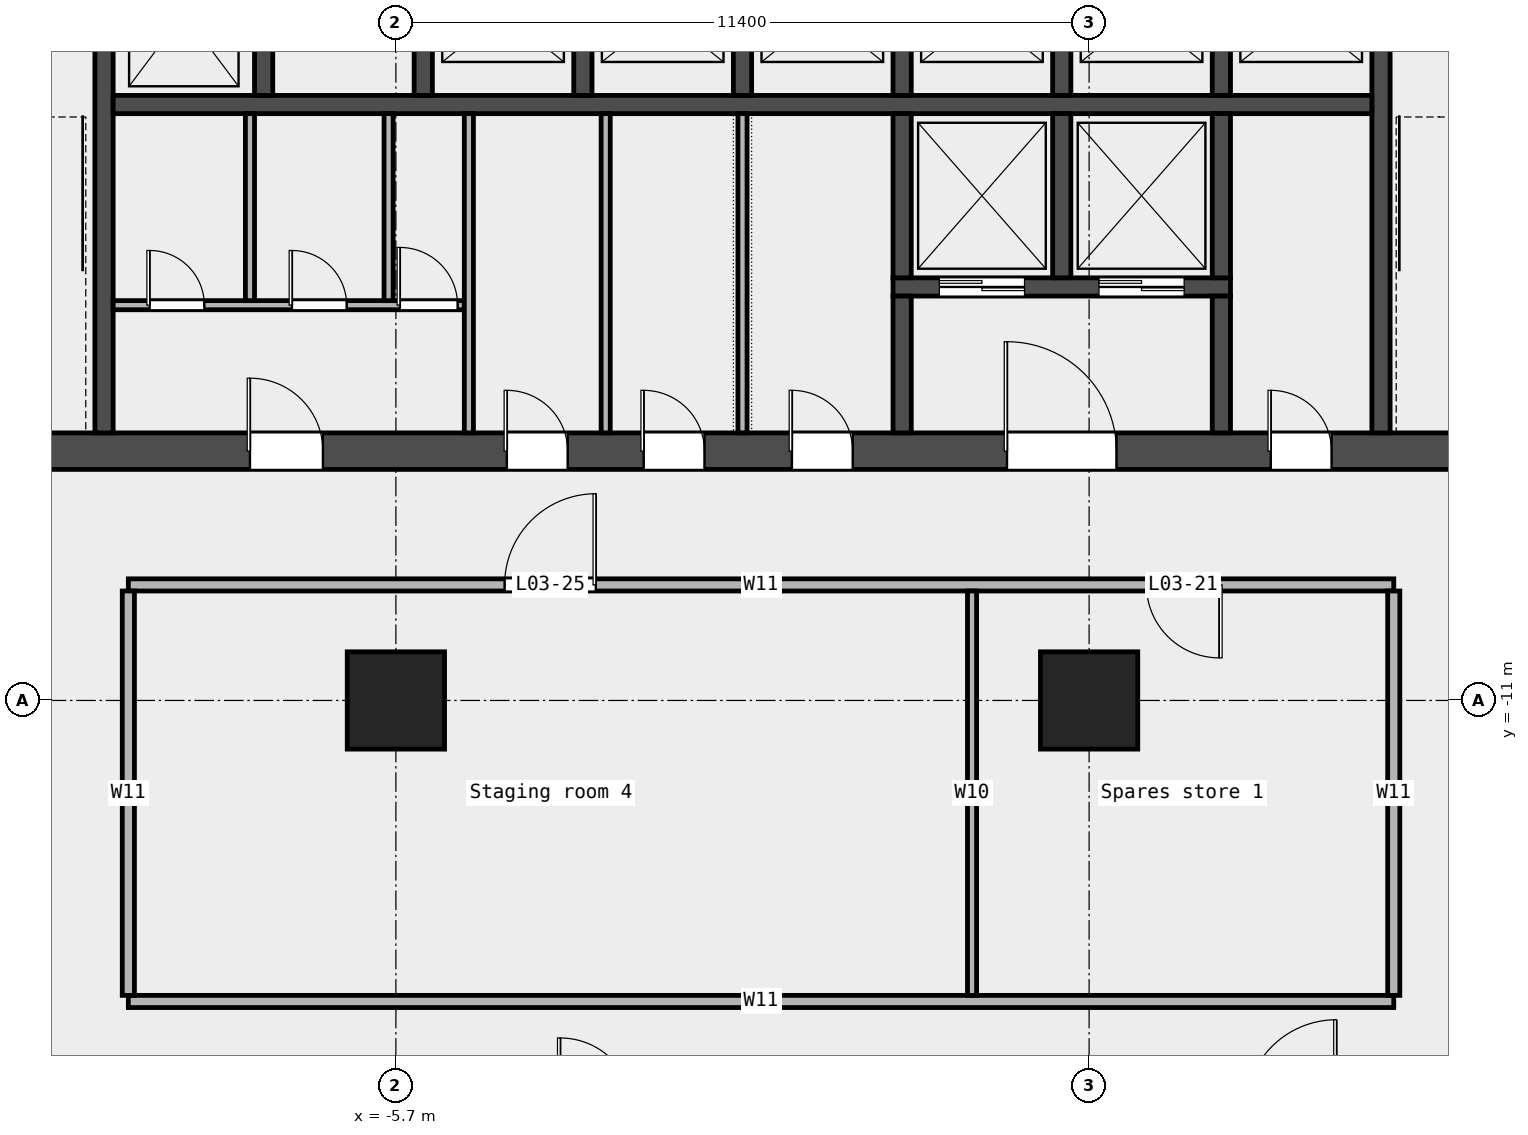
"""IFC4 building model, lengths in metres.
Left out: names, types, materials, properties, quantities, classifications, styles, units other than length and angle.
Written with IfcOpenShell. Run it as: python <this file> out.ifc"""

import sys

from ifc_helpers import new_model, si_unit, direction, frame, frame_2d, origin, origin_2d, place, context, subcontext, project, spatial, rectangle, extrude, element, fill, save


model = new_model("IFC4")
c1 = context("Model", 3, precision=1e-05, world=origin(), true_north=direction((0.0, 1.0)))
c2 = subcontext(c1, "Body", "Model", "MODEL_VIEW")
j1 = project(units=[si_unit("LENGTHUNIT", "METRE"), si_unit("PLANEANGLEUNIT", "RADIAN")], contexts=[c1])
p1 = place(None, origin())
s1 = spatial("IfcSite", under=j1, at=p1, CompositionType="ELEMENT")
p2 = place(p1, origin())
s2 = spatial("IfcBuilding", under=s1, at=p2, CompositionType="ELEMENT")
p3 = place(p2, frame((0.0, 0.0, 20.0)))
s3 = spatial("IfcBuildingStorey", under=s2, at=p3, CompositionType="ELEMENT", Elevation=20.0)
for number, where, z_axis, x_axis in (
    (1, (-5.7, -11.0, 0.0), (0.0, 0.0, 1.0), (1.0, 0.0, 0.0)),
    (2, (5.7, -11.0, 0.0), (0.0, 0.0, 1.0), (1.0, 0.0, 0.0)),
):
    element("IfcColumn", number, at=place(p3, frame(where, z_axis=z_axis, x_axis=x_axis)), inside=s3, PredefinedType="COLUMN", context=c2, shape_type="SweptSolid", body=[
        extrude(rectangle(XDim=1.6, YDim=1.6, at=origin_2d()), origin(), (0.0, 0.0, 1.0), 5.0),
    ])
p4 = place(p3, frame((-10.1, -15.95, 0.0), z_axis=(0.0, 0.0, 1.0), x_axis=(1.0, 0.0, 0.0)))
e3 = element("IfcWall", 3, at=p4, inside=s3, PredefinedType="PARTITIONING", context=c2, shape_type="SweptSolid", body=[
    extrude(rectangle(XDim=20.81, YDim=0.2, at=frame_2d((10.405, 0.0))), origin(), (0.0, 0.0, 1.0), 5.0),
])
p5 = place(p3, frame((-10.1, -9.1, 0.0), z_axis=(0.0, 0.0, 1.0), x_axis=(1.0, 0.0, 0.0)))
e4 = element("IfcWall", 4, at=p5, inside=s3, PredefinedType="PARTITIONING", context=c2, shape_type="SweptSolid", body=[
    extrude(rectangle(XDim=20.81, YDim=0.2, at=frame_2d((10.405, 0.0))), origin(), (0.0, 0.0, 1.0), 5.0),
])
p6 = place(p5, frame((16.742, 0.0, 0.0)))
e5 = element("IfcOpeningElement", 5, at=p6, cuts=e4, PredefinedType="OPENING", context=c2, shape_type="SweptSolid", body=[
    extrude(rectangle(XDim=1.2, YDim=2.1, at=frame_2d((0.6, 1.05))), frame((0.0, 0.112, 0.0), z_axis=(0.0, -1.0, 0.0), x_axis=(1.0, 0.0, 0.0)), (0.0, 0.0, 1.0), 0.224),
])
p7 = place(p5, frame((6.188, 0.0, 0.0)))
e6 = element("IfcOpeningElement", 6, at=p7, cuts=e4, PredefinedType="OPENING", context=c2, shape_type="SweptSolid", body=[
    extrude(rectangle(XDim=1.5, YDim=2.1, at=frame_2d((0.75, 1.05))), frame((0.0, 0.112, 0.0), z_axis=(0.0, -1.0, 0.0), x_axis=(1.0, 0.0, 0.0)), (0.0, 0.0, 1.0), 0.224),
])
p8 = place(p3, frame((-10.1, -15.85, 0.0), z_axis=(0.0, 0.0, 1.0), x_axis=(0.0, 1.0, 0.0)))
e7 = element("IfcWall", 7, at=p8, inside=s3, PredefinedType="PARTITIONING", context=c2, shape_type="SweptSolid", body=[
    extrude(rectangle(XDim=6.65, YDim=0.2, at=frame_2d((3.325, 0.0))), origin(), (0.0, 0.0, 1.0), 5.0),
])
p9 = place(p3, frame((3.775, -15.85, 0.0), z_axis=(0.0, 0.0, 1.0), x_axis=(0.0, 1.0, 0.0)))
e8 = element("IfcWall", 8, at=p9, inside=s3, PredefinedType="PARTITIONING", context=c2, shape_type="SweptSolid", body=[
    extrude(rectangle(XDim=6.65, YDim=0.15, at=frame_2d((3.325, 0.0))), origin(), (0.0, 0.0, 1.0), 5.0),
])
p10 = place(p3, frame((10.71, -15.85, 0.0), z_axis=(0.0, 0.0, 1.0), x_axis=(0.0, 1.0, 0.0)))
e9 = element("IfcWall", 9, at=p10, inside=s3, PredefinedType="PARTITIONING", context=c2, shape_type="SweptSolid", body=[
    extrude(rectangle(XDim=6.65, YDim=0.2, at=frame_2d((3.325, 0.0))), origin(), (0.0, 0.0, 1.0), 5.0),
])
p11 = place(p3, frame((-14.4, -6.9, 0.0), z_axis=(0.0, 0.0, 1.0), x_axis=(1.0, 0.0, 0.0)))
e10 = element("IfcWall", 10, at=p11, inside=s3, PredefinedType="SHEAR", context=c2, shape_type="SweptSolid", body=[
    extrude(rectangle(XDim=28.8, YDim=0.6, at=frame_2d((14.4, 0.0))), origin(), (0.0, 0.0, 1.0), 5.2),
])
p12 = place(p11, frame((6.3, 0.0, 0.0)))
e11 = element("IfcOpeningElement", 11, at=p12, cuts=e10, PredefinedType="OPENING", context=c2, shape_type="SweptSolid", body=[
    extrude(rectangle(XDim=1.2, YDim=2.1, at=frame_2d((0.6, 1.05))), frame((0.0, 0.312, 0.0), z_axis=(0.0, -1.0, 0.0), x_axis=(1.0, 0.0, 0.0)), (0.0, 0.0, 1.0), 0.624),
])
p13 = place(p11, frame((10.525, 0.0, 0.0)))
e12 = element("IfcOpeningElement", 12, at=p13, cuts=e10, PredefinedType="OPENING", context=c2, shape_type="SweptSolid", body=[
    extrude(rectangle(XDim=1.0, YDim=2.1, at=frame_2d((0.5, 1.05))), frame((0.0, 0.312, 0.0), z_axis=(0.0, -1.0, 0.0), x_axis=(1.0, 0.0, 0.0)), (0.0, 0.0, 1.0), 0.624),
])
p14 = place(p11, frame((12.775, 0.0, 0.0)))
e13 = element("IfcOpeningElement", 13, at=p14, cuts=e10, PredefinedType="OPENING", context=c2, shape_type="SweptSolid", body=[
    extrude(rectangle(XDim=1.0, YDim=2.1, at=frame_2d((0.5, 1.05))), frame((0.0, 0.312, 0.0), z_axis=(0.0, -1.0, 0.0), x_axis=(1.0, 0.0, 0.0)), (0.0, 0.0, 1.0), 0.624),
])
p15 = place(p11, frame((15.212, 0.0, 0.0)))
e14 = element("IfcOpeningElement", 14, at=p15, cuts=e10, PredefinedType="OPENING", context=c2, shape_type="SweptSolid", body=[
    extrude(rectangle(XDim=1.0, YDim=2.1, at=frame_2d((0.5, 1.05))), frame((0.0, 0.312, 0.0), z_axis=(0.0, -1.0, 0.0), x_axis=(1.0, 0.0, 0.0)), (0.0, 0.0, 1.0), 0.624),
])
p16 = place(p11, frame((18.75, 0.0, 0.0)))
e15 = element("IfcOpeningElement", 15, at=p16, cuts=e10, PredefinedType="OPENING", context=c2, shape_type="SweptSolid", body=[
    extrude(rectangle(XDim=1.8, YDim=2.1, at=frame_2d((0.9, 1.05))), frame((0.0, 0.312, 0.0), z_axis=(0.0, -1.0, 0.0), x_axis=(1.0, 0.0, 0.0)), (0.0, 0.0, 1.0), 0.624),
])
p17 = place(p11, frame((23.087, 0.0, 0.0)))
e16 = element("IfcOpeningElement", 16, at=p17, cuts=e10, PredefinedType="OPENING", context=c2, shape_type="SweptSolid", body=[
    extrude(rectangle(XDim=1.0, YDim=2.1, at=frame_2d((0.5, 1.05))), frame((0.0, 0.312, 0.0), z_axis=(0.0, -1.0, 0.0), x_axis=(1.0, 0.0, 0.0)), (0.0, 0.0, 1.0), 0.624),
])
for number, where, z_axis, x_axis in (
    (17, (-10.5, -6.6, 0.0), (0.0, 0.0, 1.0), (0.0, 1.0, 0.0)),
    (18, (10.5, -6.6, 0.0), (0.0, 0.0, 1.0), (0.0, 1.0, 0.0)),
):
    element("IfcWall", number, at=place(p3, frame(where, z_axis=z_axis, x_axis=x_axis)), inside=s3, PredefinedType="SHEAR", context=c2, shape_type="SweptSolid", body=[
        extrude(rectangle(XDim=8.55, YDim=0.3, at=frame_2d((4.275, 0.0))), origin(), (0.0, 0.0, 1.0), 5.2),
    ])
p18 = place(p3, frame((-10.35, -1.2, 0.0), z_axis=(0.0, 0.0, 1.0), x_axis=(1.0, 0.0, 0.0)))
e19 = element("IfcWall", 19, at=p18, inside=s3, PredefinedType="SOLIDWALL", context=c2, shape_type="SweptSolid", body=[
    extrude(rectangle(XDim=20.7, YDim=0.3, at=frame_2d((10.35, 0.0))), origin(), (0.0, 0.0, 1.0), 5.2),
])
for number, where, z_axis, x_axis in (
    (20, (-7.875, -1.05, 0.0), (0.0, 0.0, 1.0), (0.0, 1.0, 0.0)),
    (21, (-5.25, -1.05, 0.0), (0.0, 0.0, 1.0), (0.0, 1.0, 0.0)),
    (22, (-2.625, -1.05, 0.0), (0.0, 0.0, 1.0), (0.0, 1.0, 0.0)),
    (23, (0.0, -1.05, 0.0), (0.0, 0.0, 1.0), (0.0, 1.0, 0.0)),
    (24, (2.625, -1.05, 0.0), (0.0, 0.0, 1.0), (0.0, 1.0, 0.0)),
    (25, (5.25, -1.05, 0.0), (0.0, 0.0, 1.0), (0.0, 1.0, 0.0)),
    (26, (7.875, -1.05, 0.0), (0.0, 0.0, 1.0), (0.0, 1.0, 0.0)),
):
    element("IfcWall", number, at=place(p3, frame(where, z_axis=z_axis, x_axis=x_axis)), inside=s3, PredefinedType="SOLIDWALL", context=c2, shape_type="SweptSolid", body=[
        extrude(rectangle(XDim=2.7, YDim=0.3, at=frame_2d((1.35, 0.0))), origin(), (0.0, 0.0, 1.0), 5.2),
    ])
p19 = place(p3, frame((2.475, -4.2, 0.0), z_axis=(0.0, 0.0, 1.0), x_axis=(1.0, 0.0, 0.0)))
e27 = element("IfcWall", 27, at=p19, inside=s3, PredefinedType="SOLIDWALL", context=c2, shape_type="SweptSolid", body=[
    extrude(rectangle(XDim=5.55, YDim=0.3, at=frame_2d((2.775, 0.0))), origin(), (0.0, 0.0, 1.0), 5.2),
])
p20 = place(p19, frame((0.762, 0.0, 0.0)))
e28 = element("IfcOpeningElement", 28, at=p20, cuts=e27, PredefinedType="OPENING", context=c2, shape_type="SweptSolid", body=[
    extrude(rectangle(XDim=1.4, YDim=2.1, at=frame_2d((0.7, 1.05))), frame((0.0, 0.162, 0.0), z_axis=(0.0, -1.0, 0.0), x_axis=(1.0, 0.0, 0.0)), (0.0, 0.0, 1.0), 0.324),
])
p21 = place(p19, frame((3.387, 0.0, 0.0)))
e29 = element("IfcOpeningElement", 29, at=p21, cuts=e27, PredefinedType="OPENING", context=c2, shape_type="SweptSolid", body=[
    extrude(rectangle(XDim=1.4, YDim=2.1, at=frame_2d((0.7, 1.05))), frame((0.0, 0.162, 0.0), z_axis=(0.0, -1.0, 0.0), x_axis=(1.0, 0.0, 0.0)), (0.0, 0.0, 1.0), 0.324),
])
p22 = place(p3, frame((2.625, -4.05, 0.0), z_axis=(0.0, 0.0, 1.0), x_axis=(0.0, 1.0, 0.0)))
e30 = element("IfcWall", 30, at=p22, inside=s3, PredefinedType="SOLIDWALL", context=c2, shape_type="SweptSolid", body=[
    extrude(rectangle(XDim=2.7, YDim=0.3, at=frame_2d((1.35, 0.0))), origin(), (0.0, 0.0, 1.0), 5.2),
])
p23 = place(p3, frame((2.625, -6.6, 0.0), z_axis=(0.0, 0.0, 1.0), x_axis=(0.0, 1.0, 0.0)))
e31 = element("IfcWall", 31, at=p23, inside=s3, PredefinedType="SOLIDWALL", context=c2, shape_type="SweptSolid", body=[
    extrude(rectangle(XDim=2.25, YDim=0.3, at=frame_2d((1.125, 0.0))), origin(), (0.0, 0.0, 1.0), 5.2),
])
for number, where, z_axis, x_axis in (
    (32, (5.25, -4.05, 0.0), (0.0, 0.0, 1.0), (0.0, 1.0, 0.0)),
    (33, (7.875, -4.05, 0.0), (0.0, 0.0, 1.0), (0.0, 1.0, 0.0)),
):
    element("IfcWall", number, at=place(p3, frame(where, z_axis=z_axis, x_axis=x_axis)), inside=s3, PredefinedType="SOLIDWALL", context=c2, shape_type="SweptSolid", body=[
        extrude(rectangle(XDim=2.7, YDim=0.3, at=frame_2d((1.35, 0.0))), origin(), (0.0, 0.0, 1.0), 5.2),
    ])
p24 = place(p3, frame((7.875, -6.6, 0.0), z_axis=(0.0, 0.0, 1.0), x_axis=(0.0, 1.0, 0.0)))
e34 = element("IfcWall", 34, at=p24, inside=s3, PredefinedType="SOLIDWALL", context=c2, shape_type="SweptSolid", body=[
    extrude(rectangle(XDim=2.25, YDim=0.3, at=frame_2d((1.125, 0.0))), origin(), (0.0, 0.0, 1.0), 5.2),
])
p25 = place(p3, frame((-10.35, -4.5, 0.0), z_axis=(0.0, 0.0, 1.0), x_axis=(1.0, 0.0, 0.0)))
e35 = element("IfcWall", 35, at=p25, inside=s3, PredefinedType="PARTITIONING", context=c2, shape_type="SweptSolid", body=[
    extrude(rectangle(XDim=5.775, YDim=0.15, at=frame_2d((2.888, 0.0))), origin(), (0.0, 0.0, 1.0), 5.2),
])
p26 = place(p25, frame((0.6, 0.0, 0.0)))
e36 = element("IfcOpeningElement", 36, at=p26, cuts=e35, PredefinedType="OPENING", context=c2, shape_type="SweptSolid", body=[
    extrude(rectangle(XDim=0.9, YDim=2.1, at=frame_2d((0.45, 1.05))), frame((0.0, 0.087, 0.0), z_axis=(0.0, -1.0, 0.0), x_axis=(1.0, 0.0, 0.0)), (0.0, 0.0, 1.0), 0.174),
])
p27 = place(p25, frame((2.94, 0.0, 0.0)))
e37 = element("IfcOpeningElement", 37, at=p27, cuts=e35, PredefinedType="OPENING", context=c2, shape_type="SweptSolid", body=[
    extrude(rectangle(XDim=0.9, YDim=2.1, at=frame_2d((0.45, 1.05))), frame((0.0, 0.087, 0.0), z_axis=(0.0, -1.0, 0.0), x_axis=(1.0, 0.0, 0.0)), (0.0, 0.0, 1.0), 0.174),
])
p28 = place(p25, frame((4.715, 0.0, 0.0)))
e38 = element("IfcOpeningElement", 38, at=p28, cuts=e35, PredefinedType="OPENING", context=c2, shape_type="SweptSolid", body=[
    extrude(rectangle(XDim=0.95, YDim=2.1, at=frame_2d((0.475, 1.05))), frame((0.0, 0.087, 0.0), z_axis=(0.0, -1.0, 0.0), x_axis=(1.0, 0.0, 0.0)), (0.0, 0.0, 1.0), 0.174),
])
for number, where, z_axis, x_axis in (
    (39, (-8.1, -4.425, 0.0), (0.0, 0.0, 1.0), (0.0, 1.0, 0.0)),
    (40, (-5.82, -4.425, 0.0), (0.0, 0.0, 1.0), (0.0, 1.0, 0.0)),
):
    element("IfcWall", number, at=place(p3, frame(where, z_axis=z_axis, x_axis=x_axis)), inside=s3, PredefinedType="PARTITIONING", context=c2, shape_type="SweptSolid", body=[
        extrude(rectangle(XDim=3.075, YDim=0.15, at=frame_2d((1.538, 0.0))), origin(), (0.0, 0.0, 1.0), 5.2),
    ])
for number, where, z_axis, x_axis in (
    (41, (-4.5, -6.6, 0.0), (0.0, 0.0, 1.0), (0.0, 1.0, 0.0)),
    (42, (-2.25, -6.6, 0.0), (0.0, 0.0, 1.0), (0.0, 1.0, 0.0)),
    (43, (0.0, -6.6, 0.0), (0.0, 0.0, 1.0), (0.0, 1.0, 0.0)),
):
    element("IfcWall", number, at=place(p3, frame(where, z_axis=z_axis, x_axis=x_axis)), inside=s3, PredefinedType="PARTITIONING", context=c2, shape_type="SweptSolid", body=[
        extrude(rectangle(XDim=5.25, YDim=0.15, at=frame_2d((2.625, 0.0))), origin(), (0.0, 0.0, 1.0), 5.2),
    ])
p29 = place(p6, origin())
e44 = element("IfcDoor", 44, at=p29, inside=s3, OperationType="SINGLE_SWING_LEFT", PredefinedType="DOOR", context=c2, shape_type="SweptSolid", body=[
    extrude(rectangle(XDim=1.2, YDim=2.1, at=frame_2d((0.6, 1.05))), frame((0.0, 0.025, 0.0), z_axis=(0.0, -1.0, 0.0), x_axis=(1.0, 0.0, 0.0)), (0.0, 0.0, 1.0), 0.05),
])
fill(e5, e44)
p30 = place(p7, origin())
e45 = element("IfcDoor", 45, at=p30, inside=s3, OperationType="DOUBLE_DOOR_SINGLE_SWING", PredefinedType="DOOR", context=c2, shape_type="SweptSolid", body=[
    extrude(rectangle(XDim=1.5, YDim=2.1, at=frame_2d((0.75, 1.05))), frame((0.0, 0.025, 0.0), z_axis=(0.0, -1.0, 0.0), x_axis=(1.0, 0.0, 0.0)), (0.0, 0.0, 1.0), 0.05),
])
fill(e6, e45)
p31 = place(p20, origin())
e46 = element("IfcDoor", 46, at=p31, inside=s3, OperationType="DOUBLE_DOOR_SLIDING", PredefinedType="DOOR", context=c2, shape_type="SweptSolid", body=[
    extrude(rectangle(XDim=1.4, YDim=2.1, at=frame_2d((0.7, 1.05))), frame((0.0, 0.025, 0.0), z_axis=(0.0, -1.0, 0.0), x_axis=(1.0, 0.0, 0.0)), (0.0, 0.0, 1.0), 0.05),
])
fill(e28, e46)
p32 = place(p21, origin())
e47 = element("IfcDoor", 47, at=p32, inside=s3, OperationType="DOUBLE_DOOR_SLIDING", PredefinedType="DOOR", context=c2, shape_type="SweptSolid", body=[
    extrude(rectangle(XDim=1.4, YDim=2.1, at=frame_2d((0.7, 1.05))), frame((0.0, 0.025, 0.0), z_axis=(0.0, -1.0, 0.0), x_axis=(1.0, 0.0, 0.0)), (0.0, 0.0, 1.0), 0.05),
])
fill(e29, e47)
p33 = place(p12, origin())
e48 = element("IfcDoor", 48, at=p33, inside=s3, OperationType="SINGLE_SWING_LEFT", PredefinedType="DOOR", context=c2, shape_type="SweptSolid", body=[
    extrude(rectangle(XDim=1.2, YDim=2.1, at=frame_2d((0.6, 1.05))), frame((0.0, 0.025, 0.0), z_axis=(0.0, -1.0, 0.0), x_axis=(1.0, 0.0, 0.0)), (0.0, 0.0, 1.0), 0.05),
])
fill(e11, e48)
p34 = place(p26, origin())
e49 = element("IfcDoor", 49, at=p34, inside=s3, OperationType="SINGLE_SWING_LEFT", PredefinedType="DOOR", context=c2, shape_type="SweptSolid", body=[
    extrude(rectangle(XDim=0.9, YDim=2.1, at=frame_2d((0.45, 1.05))), frame((0.0, 0.025, 0.0), z_axis=(0.0, -1.0, 0.0), x_axis=(1.0, 0.0, 0.0)), (0.0, 0.0, 1.0), 0.05),
])
fill(e36, e49)
p35 = place(p27, origin())
e50 = element("IfcDoor", 50, at=p35, inside=s3, OperationType="SINGLE_SWING_LEFT", PredefinedType="DOOR", context=c2, shape_type="SweptSolid", body=[
    extrude(rectangle(XDim=0.9, YDim=2.1, at=frame_2d((0.45, 1.05))), frame((0.0, 0.025, 0.0), z_axis=(0.0, -1.0, 0.0), x_axis=(1.0, 0.0, 0.0)), (0.0, 0.0, 1.0), 0.05),
])
fill(e37, e50)
p36 = place(p28, origin())
e51 = element("IfcDoor", 51, at=p36, inside=s3, OperationType="SINGLE_SWING_LEFT", PredefinedType="DOOR", context=c2, shape_type="SweptSolid", body=[
    extrude(rectangle(XDim=0.95, YDim=2.1, at=frame_2d((0.475, 1.05))), frame((0.0, 0.025, 0.0), z_axis=(0.0, -1.0, 0.0), x_axis=(1.0, 0.0, 0.0)), (0.0, 0.0, 1.0), 0.05),
])
fill(e38, e51)
p37 = place(p13, origin())
e52 = element("IfcDoor", 52, at=p37, inside=s3, OperationType="SINGLE_SWING_LEFT", PredefinedType="DOOR", context=c2, shape_type="SweptSolid", body=[
    extrude(rectangle(XDim=1.0, YDim=2.1, at=frame_2d((0.5, 1.05))), frame((0.0, 0.025, 0.0), z_axis=(0.0, -1.0, 0.0), x_axis=(1.0, 0.0, 0.0)), (0.0, 0.0, 1.0), 0.05),
])
fill(e12, e52)
p38 = place(p14, origin())
e53 = element("IfcDoor", 53, at=p38, inside=s3, OperationType="SINGLE_SWING_LEFT", PredefinedType="DOOR", context=c2, shape_type="SweptSolid", body=[
    extrude(rectangle(XDim=1.0, YDim=2.1, at=frame_2d((0.5, 1.05))), frame((0.0, 0.025, 0.0), z_axis=(0.0, -1.0, 0.0), x_axis=(1.0, 0.0, 0.0)), (0.0, 0.0, 1.0), 0.05),
])
fill(e13, e53)
p39 = place(p15, origin())
e54 = element("IfcDoor", 54, at=p39, inside=s3, OperationType="SINGLE_SWING_LEFT", PredefinedType="DOOR", context=c2, shape_type="SweptSolid", body=[
    extrude(rectangle(XDim=1.0, YDim=2.1, at=frame_2d((0.5, 1.05))), frame((0.0, 0.025, 0.0), z_axis=(0.0, -1.0, 0.0), x_axis=(1.0, 0.0, 0.0)), (0.0, 0.0, 1.0), 0.05),
])
fill(e14, e54)
p40 = place(p16, origin())
e55 = element("IfcDoor", 55, at=p40, inside=s3, OperationType="DOUBLE_DOOR_SINGLE_SWING", PredefinedType="DOOR", context=c2, shape_type="SweptSolid", body=[
    extrude(rectangle(XDim=1.8, YDim=2.1, at=frame_2d((0.9, 1.05))), frame((0.0, 0.025, 0.0), z_axis=(0.0, -1.0, 0.0), x_axis=(1.0, 0.0, 0.0)), (0.0, 0.0, 1.0), 0.05),
])
fill(e15, e55)
p41 = place(p17, origin())
e56 = element("IfcDoor", 56, at=p41, inside=s3, OperationType="SINGLE_SWING_LEFT", PredefinedType="DOOR", context=c2, shape_type="SweptSolid", body=[
    extrude(rectangle(XDim=1.0, YDim=2.1, at=frame_2d((0.5, 1.05))), frame((0.0, 0.025, 0.0), z_axis=(0.0, -1.0, 0.0), x_axis=(1.0, 0.0, 0.0)), (0.0, 0.0, 1.0), 0.05),
])
fill(e16, e56)
save(model, sys.argv[1])
